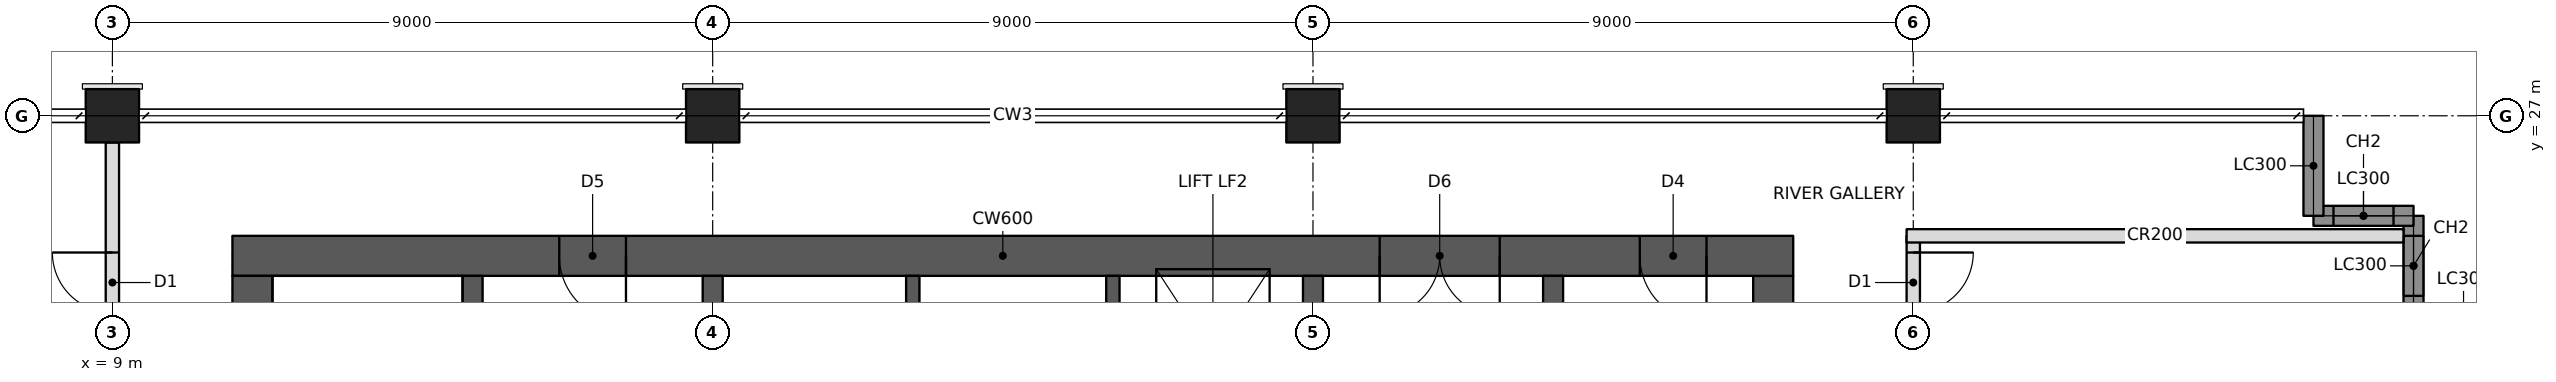
"""IFC4 building model, lengths in metres.
Left out: names, types, materials, properties, quantities, classifications, styles, units other than length and angle.
Written with IfcOpenShell. Run it as: python <this file> out.ifc"""

import sys

from ifc_helpers import new_model, si_unit, direction, frame, frame_2d, origin, origin_2d, place, context, subcontext, project, spatial, rectangle, hollow_rectangle, extrude, element, fill, save


model = new_model("IFC4")
c1 = context("Model", 3, precision=1e-05, world=origin(), true_north=direction((0.0, 1.0)))
c2 = subcontext(c1, "Body", "Model", "MODEL_VIEW")
j1 = project(units=[si_unit("LENGTHUNIT", "METRE"), si_unit("PLANEANGLEUNIT", "RADIAN")], contexts=[c1])
p1 = place(None, origin())
s1 = spatial("IfcSite", under=j1, at=p1, CompositionType="ELEMENT")
p2 = place(p1, origin())
s2 = spatial("IfcBuilding", under=s1, at=p2, CompositionType="ELEMENT")
p3 = place(p2, frame((0.0, 0.0, 194.4)))
s3 = spatial("IfcBuildingStorey", under=s2, at=p3, CompositionType="ELEMENT", Elevation=194.4)
for number, where, z_axis, x_axis in (
    (1, (9.0, 27.0, 0.0), (0.0, 0.0, 1.0), (1.0, 0.0, 0.0)),
    (2, (18.0, 27.0, 0.0), (0.0, 0.0, 1.0), (1.0, 0.0, 0.0)),
    (3, (27.0, 27.0, 0.0), (0.0, 0.0, 1.0), (1.0, 0.0, 0.0)),
    (4, (36.0, 27.0, 0.0), (0.0, 0.0, 1.0), (1.0, 0.0, 0.0)),
):
    element("IfcColumn", number, at=place(p3, frame(where, z_axis=z_axis, x_axis=x_axis)), inside=s3, PredefinedType="COLUMN", context=c2, shape_type="SweptSolid", body=[
        extrude(hollow_rectangle(XDim=0.8, YDim=0.8, WallThickness=0.06, at=origin_2d()), origin(), (0.0, 0.0, 1.0), 3.4),
    ])
p4 = place(p3, frame((10.8, 24.9, 0.0), z_axis=(0.0, 0.0, 1.0), x_axis=(1.0, 0.0, 0.0)))
e5 = element("IfcWall", 5, at=p4, inside=s3, PredefinedType="SHEAR", context=c2, shape_type="SweptSolid", body=[
    extrude(rectangle(XDim=23.4, YDim=0.6, at=frame_2d((11.7, 0.0))), origin(), (0.0, 0.0, 1.0), 3.4),
])
p5 = place(p4, frame((17.2, 0.0, 0.0)))
e6 = element("IfcOpeningElement", 6, at=p5, cuts=e5, PredefinedType="OPENING", context=c2, shape_type="SweptSolid", body=[
    extrude(rectangle(XDim=1.8, YDim=2.1, at=frame_2d((0.9, 1.05))), frame((0.0, 0.31, 0.0), z_axis=(0.0, -1.0, 0.0), x_axis=(1.0, 0.0, 0.0)), (0.0, 0.0, 1.0), 0.62),
])
p6 = place(p4, frame((21.1, 0.0, 0.0)))
e7 = element("IfcOpeningElement", 7, at=p6, cuts=e5, PredefinedType="OPENING", context=c2, shape_type="SweptSolid", body=[
    extrude(rectangle(XDim=1.0, YDim=2.1, at=frame_2d((0.5, 1.05))), frame((0.0, 0.31, 0.0), z_axis=(0.0, -1.0, 0.0), x_axis=(1.0, 0.0, 0.0)), (0.0, 0.0, 1.0), 0.62),
])
p7 = place(p4, frame((4.9, 0.0, 0.0)))
e8 = element("IfcOpeningElement", 8, at=p7, cuts=e5, PredefinedType="OPENING", context=c2, shape_type="SweptSolid", body=[
    extrude(rectangle(XDim=1.0, YDim=2.1, at=frame_2d((0.5, 1.05))), frame((0.0, 0.31, 0.0), z_axis=(0.0, -1.0, 0.0), x_axis=(1.0, 0.0, 0.0)), (0.0, 0.0, 1.0), 0.62),
])
for number, where, z_axis, x_axis in (
    (9, (11.1, 11.4, 0.0), (0.0, 0.0, 1.0), (0.0, 1.0, 0.0)),
    (10, (33.9, 11.4, 0.0), (0.0, 0.0, 1.0), (0.0, 1.0, 0.0)),
):
    element("IfcWall", number, at=place(p3, frame(where, z_axis=z_axis, x_axis=x_axis)), inside=s3, PredefinedType="SHEAR", context=c2, shape_type="SweptSolid", body=[
        extrude(rectangle(XDim=13.2, YDim=0.6, at=frame_2d((6.6, 0.0))), origin(), (0.0, 0.0, 1.0), 3.4),
    ])
p8 = place(p3, frame((14.4, 11.4, 0.0), z_axis=(0.0, 0.0, 1.0), x_axis=(0.0, 1.0, 0.0)))
e11 = element("IfcWall", 11, at=p8, inside=s3, PredefinedType="SHEAR", context=c2, shape_type="SweptSolid", body=[
    extrude(rectangle(XDim=13.2, YDim=0.3, at=frame_2d((6.6, 0.0))), origin(), (0.0, 0.0, 1.0), 3.4),
])
p9 = place(p3, frame((18.0, 11.4, 0.0), z_axis=(0.0, 0.0, 1.0), x_axis=(0.0, 1.0, 0.0)))
e12 = element("IfcWall", 12, at=p9, inside=s3, PredefinedType="SHEAR", context=c2, shape_type="SweptSolid", body=[
    extrude(rectangle(XDim=13.2, YDim=0.3, at=frame_2d((6.6, 0.0))), origin(), (0.0, 0.0, 1.0), 3.4),
])
p10 = place(p9, frame((3.6, 0.0, 0.0)))
e13 = element("IfcOpeningElement", 13, at=p10, cuts=e12, PredefinedType="OPENING", context=c2, shape_type="SweptSolid", body=[
    extrude(rectangle(XDim=1.0, YDim=2.1, at=frame_2d((0.5, 1.05))), frame((0.0, 0.16, 0.0), z_axis=(0.0, -1.0, 0.0), x_axis=(1.0, 0.0, 0.0)), (0.0, 0.0, 1.0), 0.32),
])
p11 = place(p9, frame((7.85, 0.0, 0.0)))
e14 = element("IfcOpeningElement", 14, at=p11, cuts=e12, PredefinedType="OPENING", context=c2, shape_type="SweptSolid", body=[
    extrude(rectangle(XDim=1.1, YDim=2.1, at=frame_2d((0.55, 1.05))), frame((0.0, 0.16, 0.0), z_axis=(0.0, -1.0, 0.0), x_axis=(1.0, 0.0, 0.0)), (0.0, 0.0, 1.0), 0.32),
])
p12 = place(p3, frame((27.0, 21.75, 0.0), z_axis=(0.0, 0.0, 1.0), x_axis=(0.0, 1.0, 0.0)))
e15 = element("IfcWall", 15, at=p12, inside=s3, PredefinedType="SHEAR", context=c2, shape_type="SweptSolid", body=[
    extrude(rectangle(XDim=2.85, YDim=0.3, at=frame_2d((1.425, 0.0))), origin(), (0.0, 0.0, 1.0), 3.4),
])
for number, where, z_axis, x_axis in (
    (16, (21.0, 21.75, 0.0), (0.0, 0.0, 1.0), (0.0, 1.0, 0.0)),
    (17, (24.0, 21.75, 0.0), (0.0, 0.0, 1.0), (0.0, 1.0, 0.0)),
):
    element("IfcWall", number, at=place(p3, frame(where, z_axis=z_axis, x_axis=x_axis)), inside=s3, PredefinedType="SHEAR", context=c2, shape_type="SweptSolid", body=[
        extrude(rectangle(XDim=2.85, YDim=0.2, at=frame_2d((1.425, 0.0))), origin(), (0.0, 0.0, 1.0), 3.4),
    ])
p13 = place(p3, frame((30.6, 11.4, 0.0), z_axis=(0.0, 0.0, 1.0), x_axis=(0.0, 1.0, 0.0)))
e18 = element("IfcWall", 18, at=p13, inside=s3, PredefinedType="SHEAR", context=c2, shape_type="SweptSolid", body=[
    extrude(rectangle(XDim=13.2, YDim=0.3, at=frame_2d((6.6, 0.0))), origin(), (0.0, 0.0, 1.0), 3.4),
])
p14 = place(p3, frame((43.5, 24.0, 0.0), z_axis=(0.0, 0.0, 1.0), x_axis=(0.0, 1.0, 0.0)))
e19 = element("IfcWall", 19, at=p14, inside=s3, PredefinedType="SOLIDWALL", context=c2, shape_type="SweptSolid", body=[
    extrude(rectangle(XDim=1.5, YDim=0.3, at=frame_2d((0.75, 0.0))), origin(), (0.0, 0.0, 1.0), 3.2),
])
p15 = place(p14, frame((0.3, 0.0, 0.6)))
e20 = element("IfcOpeningElement", 20, at=p15, cuts=e19, PredefinedType="OPENING", context=c2, shape_type="SweptSolid", body=[
    extrude(rectangle(XDim=0.9, YDim=2.2, at=frame_2d((0.45, 1.1))), frame((0.0, 0.16, 0.0), z_axis=(0.0, -1.0, 0.0), x_axis=(1.0, 0.0, 0.0)), (0.0, 0.0, 1.0), 0.32),
])
p16 = place(p3, frame((43.5, 25.5, 0.0), z_axis=(0.0, 0.0, 1.0), x_axis=(-1.0, 0.0, 0.0)))
e21 = element("IfcWall", 21, at=p16, inside=s3, PredefinedType="SOLIDWALL", context=c2, shape_type="SweptSolid", body=[
    extrude(rectangle(XDim=1.5, YDim=0.3, at=frame_2d((0.75, 0.0))), origin(), (0.0, 0.0, 1.0), 3.2),
])
p17 = place(p16, frame((0.3, 0.0, 0.6)))
e22 = element("IfcOpeningElement", 22, at=p17, cuts=e21, PredefinedType="OPENING", context=c2, shape_type="SweptSolid", body=[
    extrude(rectangle(XDim=0.9, YDim=2.2, at=frame_2d((0.45, 1.1))), frame((0.0, 0.16, 0.0), z_axis=(0.0, -1.0, 0.0), x_axis=(1.0, 0.0, 0.0)), (0.0, 0.0, 1.0), 0.32),
])
p18 = place(p3, frame((42.0, 25.5, 0.0), z_axis=(0.0, 0.0, 1.0), x_axis=(0.0, 1.0, 0.0)))
e23 = element("IfcWall", 23, at=p18, inside=s3, PredefinedType="SOLIDWALL", context=c2, shape_type="SweptSolid", body=[
    extrude(rectangle(XDim=1.5, YDim=0.3, at=frame_2d((0.75, 0.0))), origin(), (0.0, 0.0, 1.0), 2.42),
])
p19 = place(p3, frame((9.0, 18.4, 0.0), z_axis=(0.0, 0.0, 1.0), x_axis=(0.0, 1.0, 0.0)))
e24 = element("IfcWall", 24, at=p19, inside=s3, PredefinedType="PARTITIONING", context=c2, shape_type="SweptSolid", body=[
    extrude(rectangle(XDim=8.2, YDim=0.2, at=frame_2d((4.1, 0.0))), origin(), (0.0, 0.0, 1.0), 2.405),
])
p20 = place(p19, frame((5.65, 0.0, 0.0)))
e25 = element("IfcOpeningElement", 25, at=p20, cuts=e24, PredefinedType="OPENING", context=c2, shape_type="SweptSolid", body=[
    extrude(rectangle(XDim=0.9, YDim=2.1, at=frame_2d((0.45, 1.05))), frame((0.0, 0.11, 0.0), z_axis=(0.0, -1.0, 0.0), x_axis=(1.0, 0.0, 0.0)), (0.0, 0.0, 1.0), 0.22),
])
p21 = place(p3, frame((36.0, 18.4, 0.0), z_axis=(0.0, 0.0, 1.0), x_axis=(0.0, 1.0, 0.0)))
e26 = element("IfcWall", 26, at=p21, inside=s3, PredefinedType="PARTITIONING", context=c2, shape_type="SweptSolid", body=[
    extrude(rectangle(XDim=6.8, YDim=0.2, at=frame_2d((3.4, 0.0))), origin(), (0.0, 0.0, 1.0), 2.405),
])
p22 = place(p21, frame((5.65, 0.0, 0.0)))
e27 = element("IfcOpeningElement", 27, at=p22, cuts=e26, PredefinedType="OPENING", context=c2, shape_type="SweptSolid", body=[
    extrude(rectangle(XDim=0.9, YDim=2.1, at=frame_2d((0.45, 1.05))), frame((0.0, 0.11, 0.0), z_axis=(0.0, -1.0, 0.0), x_axis=(1.0, 0.0, 0.0)), (0.0, 0.0, 1.0), 0.22),
])
p23 = place(p3, frame((35.9, 25.2, 0.0), z_axis=(0.0, 0.0, 1.0), x_axis=(1.0, 0.0, 0.0)))
e28 = element("IfcWall", 28, at=p23, inside=s3, PredefinedType="PARTITIONING", context=c2, shape_type="SweptSolid", body=[
    extrude(rectangle(XDim=7.45, YDim=0.2, at=frame_2d((3.725, 0.0))), origin(), (0.0, 0.0, 1.0), 2.404),
])
p24 = place(p15, origin())
e29 = element("IfcWindow", 29, at=p24, inside=s3, PartitioningType="SINGLE_PANEL", PredefinedType="WINDOW", context=c2, shape_type="SweptSolid", body=[
    extrude(rectangle(XDim=0.9, YDim=2.2, at=frame_2d((0.45, 1.1))), frame((0.0, 0.03, 0.0), z_axis=(0.0, -1.0, 0.0), x_axis=(1.0, 0.0, 0.0)), (0.0, 0.0, 1.0), 0.06),
])
fill(e20, e29)
p25 = place(p17, origin())
e30 = element("IfcWindow", 30, at=p25, inside=s3, PartitioningType="SINGLE_PANEL", PredefinedType="WINDOW", context=c2, shape_type="SweptSolid", body=[
    extrude(rectangle(XDim=0.9, YDim=2.2, at=frame_2d((0.45, 1.1))), frame((0.0, 0.03, 0.0), z_axis=(0.0, -1.0, 0.0), x_axis=(1.0, 0.0, 0.0)), (0.0, 0.0, 1.0), 0.06),
])
fill(e22, e30)
p26 = place(p20, origin())
e31 = element("IfcDoor", 31, at=p26, inside=s3, OperationType="SINGLE_SWING_RIGHT", PredefinedType="DOOR", context=c2, shape_type="SweptSolid", body=[
    extrude(rectangle(XDim=0.9, YDim=2.1, at=frame_2d((0.45, 1.05))), frame((0.0, 0.025, 0.0), z_axis=(0.0, -1.0, 0.0), x_axis=(1.0, 0.0, 0.0)), (0.0, 0.0, 1.0), 0.05),
])
fill(e25, e31)
p27 = place(p22, frame((0.9, 0.0, 0.0), z_axis=(0.0, 0.0, 1.0), x_axis=(-1.0, 0.0, 0.0)))
e32 = element("IfcDoor", 32, at=p27, inside=s3, OperationType="SINGLE_SWING_LEFT", PredefinedType="DOOR", context=c2, shape_type="SweptSolid", body=[
    extrude(rectangle(XDim=0.9, YDim=2.1, at=frame_2d((0.45, 1.05))), frame((0.0, 0.025, 0.0), z_axis=(0.0, -1.0, 0.0), x_axis=(1.0, 0.0, 0.0)), (0.0, 0.0, 1.0), 0.05),
])
fill(e27, e32)
p28 = place(p5, frame((1.8, 0.0, 0.0), z_axis=(0.0, 0.0, 1.0), x_axis=(-1.0, 0.0, 0.0)))
e33 = element("IfcDoor", 33, at=p28, inside=s3, OperationType="DOUBLE_DOOR_SINGLE_SWING", PredefinedType="DOOR", context=c2, shape_type="SweptSolid", body=[
    extrude(rectangle(XDim=1.8, YDim=2.1, at=frame_2d((0.9, 1.05))), frame((0.0, 0.025, 0.0), z_axis=(0.0, -1.0, 0.0), x_axis=(1.0, 0.0, 0.0)), (0.0, 0.0, 1.0), 0.05),
])
fill(e6, e33)
p29 = place(p6, frame((1.0, 0.0, 0.0), z_axis=(0.0, 0.0, 1.0), x_axis=(-1.0, 0.0, 0.0)))
e34 = element("IfcDoor", 34, at=p29, inside=s3, OperationType="SINGLE_SWING_LEFT", PredefinedType="DOOR", context=c2, shape_type="SweptSolid", body=[
    extrude(rectangle(XDim=1.0, YDim=2.1, at=frame_2d((0.5, 1.05))), frame((0.0, 0.025, 0.0), z_axis=(0.0, -1.0, 0.0), x_axis=(1.0, 0.0, 0.0)), (0.0, 0.0, 1.0), 0.05),
])
fill(e7, e34)
p30 = place(p7, frame((1.0, 0.0, 0.0), z_axis=(0.0, 0.0, 1.0), x_axis=(-1.0, 0.0, 0.0)))
e35 = element("IfcDoor", 35, at=p30, inside=s3, OperationType="SINGLE_SWING_LEFT", PredefinedType="DOOR", context=c2, shape_type="SweptSolid", body=[
    extrude(rectangle(XDim=1.0, YDim=2.1, at=frame_2d((0.5, 1.05))), frame((0.0, 0.025, 0.0), z_axis=(0.0, -1.0, 0.0), x_axis=(1.0, 0.0, 0.0)), (0.0, 0.0, 1.0), 0.05),
])
fill(e8, e35)
save(model, sys.argv[1])
